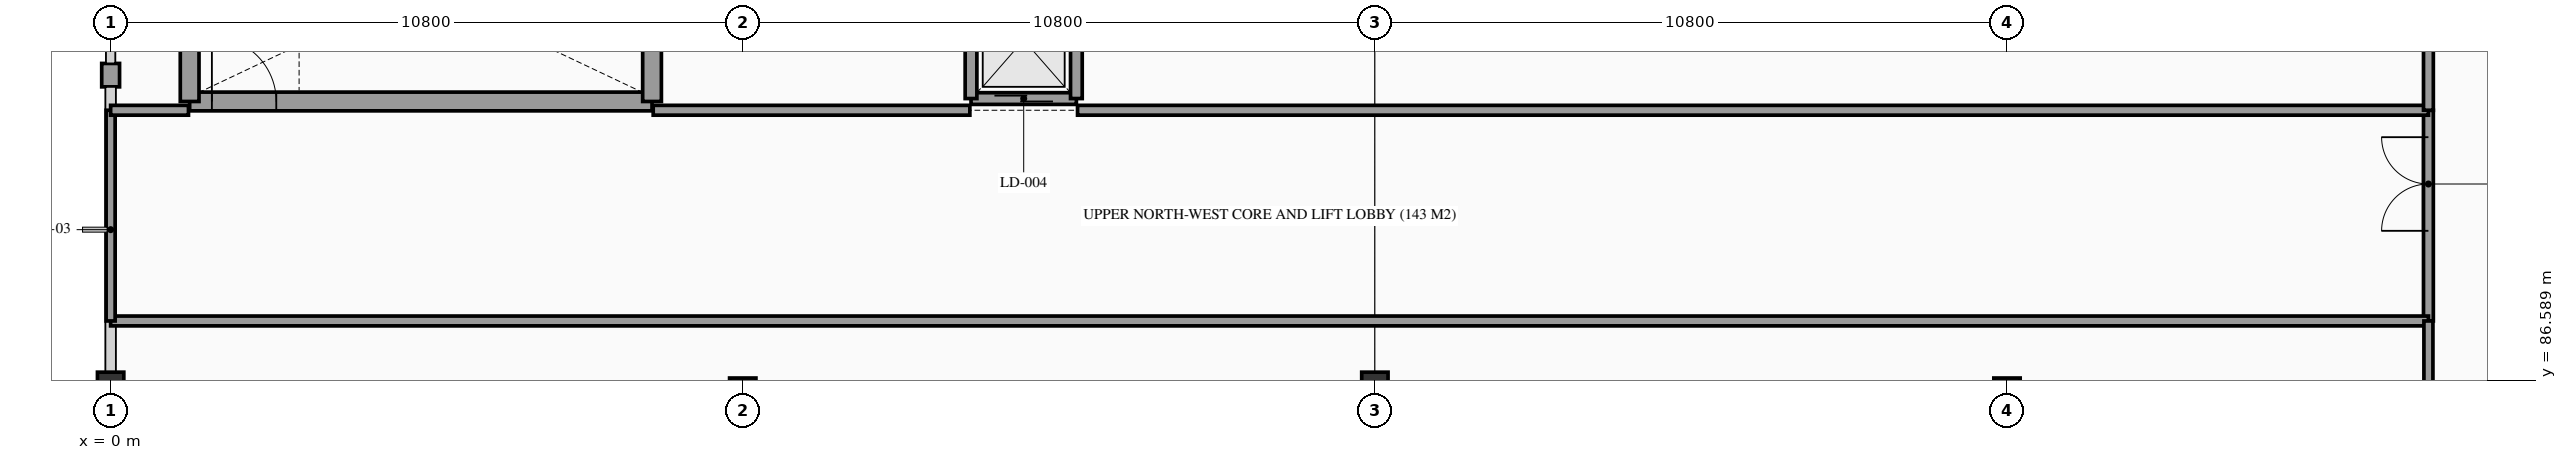
"""IFC4 building model, lengths in metres.
Left out: names, types, materials, properties, quantities, classifications, styles, units other than length and angle.
Written with IfcOpenShell. Run it as: python <this file> out.ifc"""

import sys

from ifc_helpers import new_model, si_unit, direction, frame, frame_2d, origin, origin_2d, place, context, subcontext, project, spatial, rectangle, extrude, element, fill, save


model = new_model("IFC4")
c1 = context("Model", 3, precision=1e-05, world=origin(), true_north=direction((0.0, 1.0)))
c2 = subcontext(c1, "Body", "Model", "MODEL_VIEW")
j1 = project(units=[si_unit("LENGTHUNIT", "METRE"), si_unit("PLANEANGLEUNIT", "RADIAN")], contexts=[c1])
p1 = place(None, origin())
s1 = spatial("IfcSite", under=j1, at=p1, CompositionType="ELEMENT")
p2 = place(p1, origin())
s2 = spatial("IfcBuilding", under=s1, at=p2, CompositionType="ELEMENT")
p3 = place(p2, frame((0.0, 0.0, 5.4)))
s3 = spatial("IfcBuildingStorey", under=s2, at=p3, CompositionType="ELEMENT", Elevation=5.4)
p4 = place(p3, frame((0.0, 86.4, 0.0), z_axis=(0.0, 0.0, 1.0), x_axis=(1.0, 0.0, 0.0)))
e1 = element("IfcColumn", 1, at=p4, inside=s3, PredefinedType="COLUMN", context=c2, shape_type="SweptSolid", body=[
    extrude(rectangle(XDim=0.45, YDim=0.65, at=origin_2d()), origin(), (0.0, 0.0, 1.0), 4.68),
])
p5 = place(p3, frame((10.8, 86.4, 0.0), z_axis=(0.0, 0.0, 1.0), x_axis=(1.0, 0.0, 0.0)))
e2 = element("IfcColumn", 2, at=p5, inside=s3, PredefinedType="COLUMN", context=c2, shape_type="SweptSolid", body=[
    extrude(rectangle(XDim=0.45, YDim=0.45, at=origin_2d()), origin(), (0.0, 0.0, 1.0), 4.68),
])
p6 = place(p3, frame((21.6, 86.4, 0.0), z_axis=(0.0, 0.0, 1.0), x_axis=(1.0, 0.0, 0.0)))
e3 = element("IfcColumn", 3, at=p6, inside=s3, PredefinedType="COLUMN", context=c2, shape_type="SweptSolid", body=[
    extrude(rectangle(XDim=0.45, YDim=0.65, at=origin_2d()), origin(), (0.0, 0.0, 1.0), 4.68),
])
p7 = place(p3, frame((32.4, 86.4, 0.0), z_axis=(0.0, 0.0, 1.0), x_axis=(1.0, 0.0, 0.0)))
e4 = element("IfcColumn", 4, at=p7, inside=s3, PredefinedType="COLUMN", context=c2, shape_type="SweptSolid", body=[
    extrude(rectangle(XDim=0.45, YDim=0.45, at=origin_2d()), origin(), (0.0, 0.0, 1.0), 4.68),
])
p8 = place(p3, frame((0.0, 91.6, 0.0), z_axis=(0.0, 0.0, 1.0), x_axis=(0.0, 1.0, 0.0)))
e5 = element("IfcWall", 5, at=p8, inside=s3, PredefinedType="STANDARD", context=c2, shape_type="SweptSolid", body=[
    extrude(rectangle(XDim=0.4, YDim=0.305, at=frame_2d((0.2, 0.0))), origin(), (0.0, 0.0, 1.0), 3.53),
])
p9 = place(p3, frame((1.35, 91.35, 0.0), z_axis=(0.0, 0.0, 1.0), x_axis=(1.0, 0.0, 0.0)))
e6 = element("IfcWall", 6, at=p9, inside=s3, PredefinedType="SHEAR", context=c2, shape_type="SweptSolid", body=[
    extrude(rectangle(XDim=7.9, YDim=0.32, at=frame_2d((3.95, 0.0))), origin(), (0.0, 0.0, 1.0), 4.68),
])
p10 = place(p9, frame((0.38, 0.0, 0.0)))
e7 = element("IfcOpeningElement", 7, at=p10, cuts=e6, PredefinedType="OPENING", context=c2, shape_type="SweptSolid", body=[
    extrude(rectangle(XDim=1.1, YDim=2.2, at=frame_2d((0.55, 1.1))), frame((0.0, 0.17, 0.0), z_axis=(0.0, -1.0, 0.0), x_axis=(1.0, 0.0, 0.0)), (0.0, 0.0, 1.0), 0.34),
])
for number, where, z_axis, x_axis in (
    (8, (1.35, 91.35, 0.0), (0.0, 0.0, 1.0), (0.0, 1.0, 0.0)),
    (9, (9.25, 91.35, 0.0), (0.0, 0.0, 1.0), (0.0, 1.0, 0.0)),
):
    element("IfcWall", number, at=place(p3, frame(where, z_axis=z_axis, x_axis=x_axis)), inside=s3, PredefinedType="SHEAR", context=c2, shape_type="SweptSolid", body=[
        extrude(rectangle(XDim=3.9, YDim=0.32, at=frame_2d((1.95, 0.0))), origin(), (0.0, 0.0, 1.0), 4.68),
    ])
p11 = place(p3, frame((14.7, 91.4, 0.0), z_axis=(0.0, 0.0, 1.0), x_axis=(1.0, 0.0, 0.0)))
e10 = element("IfcWall", 10, at=p11, inside=s3, PredefinedType="SOLIDWALL", context=c2, shape_type="SweptSolid", body=[
    extrude(rectangle(XDim=1.8, YDim=0.2, at=frame_2d((0.9, 0.0))), origin(), (0.0, 0.0, 1.0), 3.5),
])
p12 = place(p11, frame((0.4, 0.0, 0.0)))
e11 = element("IfcOpeningElement", 11, at=p12, cuts=e10, PredefinedType="OPENING", context=c2, shape_type="SweptSolid", body=[
    extrude(rectangle(XDim=1.0, YDim=2.15, at=frame_2d((0.5, 1.075))), frame((0.0, 0.11, 0.0), z_axis=(0.0, -1.0, 0.0), x_axis=(1.0, 0.0, 0.0)), (0.0, 0.0, 1.0), 0.22),
])
for number, where, z_axis, x_axis in (
    (12, (14.7, 91.4, 0.0), (0.0, 0.0, 1.0), (0.0, 1.0, 0.0)),
    (13, (16.5, 91.4, 0.0), (0.0, 0.0, 1.0), (0.0, 1.0, 0.0)),
):
    element("IfcWall", number, at=place(p3, frame(where, z_axis=z_axis, x_axis=x_axis)), inside=s3, PredefinedType="SOLIDWALL", context=c2, shape_type="SweptSolid", body=[
        extrude(rectangle(XDim=2.0, YDim=0.2, at=frame_2d((1.0, 0.0))), origin(), (0.0, 0.0, 1.0), 3.5),
    ])
p13 = place(p3, frame((39.6, 87.6, 0.0), z_axis=(0.0, 0.0, 1.0), x_axis=(0.0, 1.0, 0.0)))
e14 = element("IfcWall", 14, at=p13, inside=s3, PredefinedType="PARTITIONING", context=c2, shape_type="SweptSolid", body=[
    extrude(rectangle(XDim=3.6, YDim=0.168, at=frame_2d((1.8, 0.0))), origin(), (0.0, 0.0, 1.0), 3.23),
])
p14 = place(p13, frame((1.54, 0.0, 0.0)))
e15 = element("IfcOpeningElement", 15, at=p14, cuts=e14, PredefinedType="OPENING", context=c2, shape_type="SweptSolid", body=[
    extrude(rectangle(XDim=1.6, YDim=2.2, at=frame_2d((0.8, 1.1))), frame((0.0, 0.094, 0.0), z_axis=(0.0, -1.0, 0.0), x_axis=(1.0, 0.0, 0.0)), (0.0, 0.0, 1.0), 0.188),
])
p15 = place(p3, frame((0.0, 87.6, 0.0), z_axis=(0.0, 0.0, 1.0), x_axis=(1.0, 0.0, 0.0)))
e16 = element("IfcWall", 16, at=p15, inside=s3, PredefinedType="PARTITIONING", context=c2, shape_type="SweptSolid", body=[
    extrude(rectangle(XDim=39.6, YDim=0.168, at=frame_2d((19.8, 0.0))), origin(), (0.0, 0.0, 1.0), 3.23),
])
p16 = place(p3, frame((0.0, 87.6, 0.0), z_axis=(0.0, 0.0, 1.0), x_axis=(0.0, 1.0, 0.0)))
e17 = element("IfcWall", 17, at=p16, inside=s3, PredefinedType="PARTITIONING", context=c2, shape_type="SweptSolid", body=[
    extrude(rectangle(XDim=3.6, YDim=0.154, at=frame_2d((1.8, 0.0))), origin(), (0.0, 0.0, 1.0), 3.23),
])
p17 = place(p3, frame((0.0, 91.2, 0.0), z_axis=(0.0, 0.0, 1.0), x_axis=(1.0, 0.0, 0.0)))
e18 = element("IfcWall", 18, at=p17, inside=s3, PredefinedType="PARTITIONING", context=c2, shape_type="SweptSolid", body=[
    extrude(rectangle(XDim=1.33, YDim=0.168, at=frame_2d((0.665, 0.0))), origin(), (0.0, 0.0, 1.0), 3.23),
])
p18 = place(p3, frame((9.27, 91.2, 0.0), z_axis=(0.0, 0.0, 1.0), x_axis=(1.0, 0.0, 0.0)))
e19 = element("IfcWall", 19, at=p18, inside=s3, PredefinedType="PARTITIONING", context=c2, shape_type="SweptSolid", body=[
    extrude(rectangle(XDim=5.41, YDim=0.168, at=frame_2d((2.705, 0.0))), origin(), (0.0, 0.0, 1.0), 3.23),
])
p19 = place(p3, frame((16.52, 91.2, 0.0), z_axis=(0.0, 0.0, 1.0), x_axis=(1.0, 0.0, 0.0)))
e20 = element("IfcWall", 20, at=p19, inside=s3, PredefinedType="PARTITIONING", context=c2, shape_type="SweptSolid", body=[
    extrude(rectangle(XDim=23.08, YDim=0.168, at=frame_2d((11.54, 0.0))), origin(), (0.0, 0.0, 1.0), 3.23),
])
p20 = place(p3, frame((39.6, 75.6, 0.0), z_axis=(0.0, 0.0, 1.0), x_axis=(0.0, 1.0, 0.0)))
e21 = element("IfcWall", 21, at=p20, inside=s3, PredefinedType="PARTITIONING", context=c2, shape_type="SweptSolid", body=[
    extrude(rectangle(XDim=12.0, YDim=0.154, at=frame_2d((6.0, 0.0))), origin(), (0.0, 0.0, 1.0), 3.23),
])
p21 = place(p3, frame((39.6, 91.2, 0.0), z_axis=(0.0, 0.0, 1.0), x_axis=(0.0, 1.0, 0.0)))
e22 = element("IfcWall", 22, at=p21, inside=s3, PredefinedType="PARTITIONING", context=c2, shape_type="SweptSolid", body=[
    extrude(rectangle(XDim=4.2, YDim=0.168, at=frame_2d((2.1, 0.0))), origin(), (0.0, 0.0, 1.0), 3.23),
])
p22 = place(p10, frame((1.1, 0.0, 0.0), z_axis=(0.0, 0.0, 1.0), x_axis=(-1.0, 0.0, 0.0)))
e23 = element("IfcDoor", 23, at=p22, inside=s3, OperationType="SINGLE_SWING_LEFT", PredefinedType="DOOR", context=c2, shape_type="SweptSolid", body=[
    extrude(rectangle(XDim=1.1, YDim=2.2, at=frame_2d((0.55, 1.1))), frame((0.0, 0.025, 0.0), z_axis=(0.0, -1.0, 0.0), x_axis=(1.0, 0.0, 0.0)), (0.0, 0.0, 1.0), 0.05),
])
fill(e7, e23)
p23 = place(p12, origin())
e24 = element("IfcDoor", 24, at=p23, inside=s3, OperationType="DOUBLE_DOOR_SLIDING", PredefinedType="DOOR", context=c2, shape_type="SweptSolid", body=[
    extrude(rectangle(XDim=1.0, YDim=2.15, at=frame_2d((0.5, 1.075))), frame((0.0, 0.025, 0.0), z_axis=(0.0, -1.0, 0.0), x_axis=(1.0, 0.0, 0.0)), (0.0, 0.0, 1.0), 0.05),
])
fill(e11, e24)
p24 = place(p14, origin())
e25 = element("IfcDoor", 25, at=p24, inside=s3, OperationType="DOUBLE_DOOR_SINGLE_SWING", PredefinedType="DOOR", context=c2, shape_type="SweptSolid", body=[
    extrude(rectangle(XDim=1.6, YDim=2.2, at=frame_2d((0.8, 1.1))), frame((0.0, 0.025, 0.0), z_axis=(0.0, -1.0, 0.0), x_axis=(1.0, 0.0, 0.0)), (0.0, 0.0, 1.0), 0.05),
])
fill(e15, e25)
save(model, sys.argv[1])
